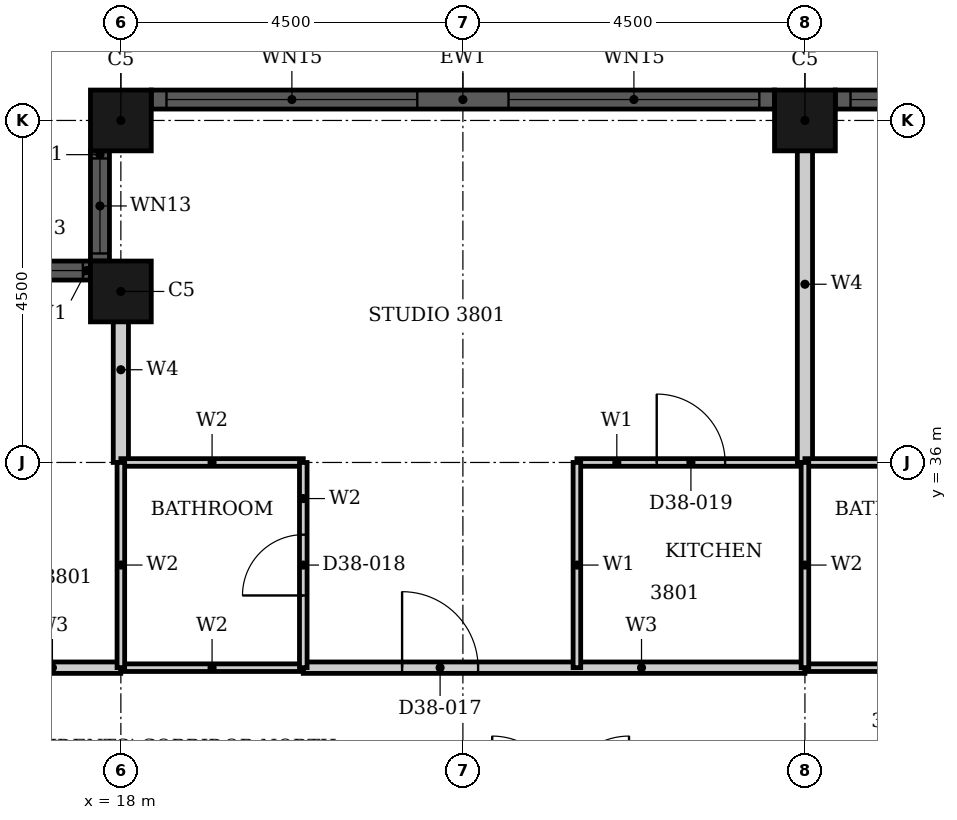
"""IFC4 building model, lengths in metres.
Left out: names, types, materials, properties, quantities, classifications, styles, units other than length and angle.
Written with IfcOpenShell. Run it as: python <this file> out.ifc"""

import sys

from ifc_helpers import new_model, si_unit, direction, frame, frame_2d, origin, origin_2d, place, context, subcontext, project, spatial, rectangle, hollow_rectangle, extrude, element, fill, save


model = new_model("IFC4")
c1 = context("Model", 3, precision=1e-05, world=origin(), true_north=direction((0.0, 1.0)))
c2 = subcontext(c1, "Body", "Model", "MODEL_VIEW")
j1 = project(units=[si_unit("LENGTHUNIT", "METRE"), si_unit("PLANEANGLEUNIT", "RADIAN")], contexts=[c1])
p1 = place(None, origin())
s1 = spatial("IfcSite", under=j1, at=p1, CompositionType="ELEMENT")
p2 = place(p1, origin())
s2 = spatial("IfcBuilding", under=s1, at=p2, CompositionType="ELEMENT")
p3 = place(p2, frame((0.0, 0.0, 154.3)))
s3 = spatial("IfcBuildingStorey", under=s2, at=p3, CompositionType="ELEMENT", Elevation=154.3)
for number, where, z_axis, x_axis in (
    (1, (27.0, 40.5, 0.0), (0.0, 0.0, 1.0), (1.0, 0.0, 0.0)),
    (2, (18.0, 40.5, 0.0), (0.0, 0.0, 1.0), (1.0, 0.0, 0.0)),
    (3, (18.0, 38.25, 0.0), (0.0, 0.0, 1.0), (1.0, 0.0, 0.0)),
):
    element("IfcColumn", number, at=place(p3, frame(where, z_axis=z_axis, x_axis=x_axis)), inside=s3, PredefinedType="COLUMN", context=c2, shape_type="SweptSolid", body=[
        extrude(hollow_rectangle(XDim=0.8, YDim=0.8, WallThickness=0.025, at=origin_2d()), origin(), (0.0, 0.0, 1.0), 3.7),
    ])
p4 = place(p3, frame((35.6, 40.775, 0.0), z_axis=(0.0, 0.0, 1.0), x_axis=(-1.0, 0.0, 0.0)))
e4 = element("IfcWall", 4, at=p4, inside=s3, PredefinedType="SOLIDWALL", context=c2, shape_type="SweptSolid", body=[
    extrude(rectangle(XDim=8.2, YDim=0.25, at=frame_2d((4.1, 0.0))), origin(), (0.0, 0.0, 1.0), 3.7),
])
p5 = place(p4, frame((0.2, 0.0, 0.45)))
e5 = element("IfcOpeningElement", 5, at=p5, cuts=e4, PredefinedType="OPENING", context=c2, shape_type="SweptSolid", body=[
    extrude(rectangle(XDim=3.3, YDim=2.3, at=frame_2d((1.65, 1.15))), frame((0.0, 0.135, 0.0), z_axis=(0.0, -1.0, 0.0), x_axis=(1.0, 0.0, 0.0)), (0.0, 0.0, 1.0), 0.27),
])
p6 = place(p4, frame((4.7, 0.0, 0.45)))
e6 = element("IfcOpeningElement", 6, at=p6, cuts=e4, PredefinedType="OPENING", context=c2, shape_type="SweptSolid", body=[
    extrude(rectangle(XDim=3.3, YDim=2.3, at=frame_2d((1.65, 1.15))), frame((0.0, 0.135, 0.0), z_axis=(0.0, -1.0, 0.0), x_axis=(1.0, 0.0, 0.0)), (0.0, 0.0, 1.0), 0.27),
])
p7 = place(p3, frame((26.6, 40.775, 0.0), z_axis=(0.0, 0.0, 1.0), x_axis=(-1.0, 0.0, 0.0)))
e7 = element("IfcWall", 7, at=p7, inside=s3, PredefinedType="SOLIDWALL", context=c2, shape_type="SweptSolid", body=[
    extrude(rectangle(XDim=8.2, YDim=0.25, at=frame_2d((4.1, 0.0))), origin(), (0.0, 0.0, 1.0), 3.7),
])
p8 = place(p7, frame((0.2, 0.0, 0.45)))
e8 = element("IfcOpeningElement", 8, at=p8, cuts=e7, PredefinedType="OPENING", context=c2, shape_type="SweptSolid", body=[
    extrude(rectangle(XDim=3.3, YDim=2.3, at=frame_2d((1.65, 1.15))), frame((0.0, 0.135, 0.0), z_axis=(0.0, -1.0, 0.0), x_axis=(1.0, 0.0, 0.0)), (0.0, 0.0, 1.0), 0.27),
])
p9 = place(p7, frame((4.7, 0.0, 0.45)))
e9 = element("IfcOpeningElement", 9, at=p9, cuts=e7, PredefinedType="OPENING", context=c2, shape_type="SweptSolid", body=[
    extrude(rectangle(XDim=3.3, YDim=2.3, at=frame_2d((1.65, 1.15))), frame((0.0, 0.135, 0.0), z_axis=(0.0, -1.0, 0.0), x_axis=(1.0, 0.0, 0.0)), (0.0, 0.0, 1.0), 0.27),
])
p10 = place(p3, frame((17.725, 40.1, 0.0), z_axis=(0.0, 0.0, 1.0), x_axis=(0.0, -1.0, 0.0)))
e10 = element("IfcWall", 10, at=p10, inside=s3, PredefinedType="SOLIDWALL", context=c2, shape_type="SweptSolid", body=[
    extrude(rectangle(XDim=1.45, YDim=0.25, at=frame_2d((0.725, 0.0))), origin(), (0.0, 0.0, 1.0), 3.7),
])
p11 = place(p10, frame((0.1, 0.0, 0.9)))
e11 = element("IfcOpeningElement", 11, at=p11, cuts=e10, PredefinedType="OPENING", context=c2, shape_type="SweptSolid", body=[
    extrude(rectangle(XDim=1.25, YDim=1.85, at=frame_2d((0.625, 0.925))), frame((0.0, 0.135, 0.0), z_axis=(0.0, -1.0, 0.0), x_axis=(1.0, 0.0, 0.0)), (0.0, 0.0, 1.0), 0.27),
])
p12 = place(p3, frame((17.6, 38.525, 0.0), z_axis=(0.0, 0.0, 1.0), x_axis=(-1.0, 0.0, 0.0)))
e12 = element("IfcWall", 12, at=p12, inside=s3, PredefinedType="SOLIDWALL", context=c2, shape_type="SweptSolid", body=[
    extrude(rectangle(XDim=1.45, YDim=0.25, at=frame_2d((0.725, 0.0))), origin(), (0.0, 0.0, 1.0), 3.7),
])
p13 = place(p12, frame((0.1, 0.0, 0.9)))
e13 = element("IfcOpeningElement", 13, at=p13, cuts=e12, PredefinedType="OPENING", context=c2, shape_type="SweptSolid", body=[
    extrude(rectangle(XDim=1.25, YDim=1.85, at=frame_2d((0.625, 0.925))), frame((0.0, 0.135, 0.0), z_axis=(0.0, -1.0, 0.0), x_axis=(1.0, 0.0, 0.0)), (0.0, 0.0, 1.0), 0.27),
])
p14 = place(p3, frame((20.4, 33.3, 0.0), z_axis=(0.0, 0.0, 1.0), x_axis=(1.0, 0.0, 0.0)))
e14 = element("IfcWall", 14, at=p14, inside=s3, PredefinedType="PARTITIONING", context=c2, shape_type="SweptSolid", body=[
    extrude(rectangle(XDim=6.6, YDim=0.15, at=frame_2d((3.3, 0.0))), origin(), (0.0, 0.0, 1.0), 3.4),
])
p15 = place(p14, frame((1.3, 0.0, 0.0)))
e15 = element("IfcOpeningElement", 15, at=p15, cuts=e14, PredefinedType="OPENING", context=c2, shape_type="SweptSolid", body=[
    extrude(rectangle(XDim=1.0, YDim=2.2, at=frame_2d((0.5, 1.1))), frame((0.0, 0.085, 0.0), z_axis=(0.0, -1.0, 0.0), x_axis=(1.0, 0.0, 0.0)), (0.0, 0.0, 1.0), 0.17),
])
p16 = place(p3, frame((16.2, 33.3, 0.0), z_axis=(0.0, 0.0, 1.0), x_axis=(1.0, 0.0, 0.0)))
e16 = element("IfcWall", 16, at=p16, inside=s3, PredefinedType="PARTITIONING", context=c2, shape_type="SweptSolid", body=[
    extrude(rectangle(XDim=1.799, YDim=0.15, at=frame_2d((0.899, 0.0))), origin(), (0.0, 0.0, 1.0), 3.4),
])
p17 = place(p3, frame((24.0, 36.0, 0.0), z_axis=(0.0, 0.0, 1.0), x_axis=(1.0, 0.0, 0.0)))
e17 = element("IfcWall", 17, at=p17, inside=s3, PredefinedType="PARTITIONING", context=c2, shape_type="SweptSolid", body=[
    extrude(rectangle(XDim=3.0, YDim=0.1, at=frame_2d((1.5, 0.0))), origin(), (0.0, 0.0, 1.0), 3.4),
])
p18 = place(p17, frame((1.05, 0.0, 0.0)))
e18 = element("IfcOpeningElement", 18, at=p18, cuts=e17, PredefinedType="OPENING", context=c2, shape_type="SweptSolid", body=[
    extrude(rectangle(XDim=0.9, YDim=2.1, at=frame_2d((0.45, 1.05))), frame((0.0, 0.06, 0.0), z_axis=(0.0, -1.0, 0.0), x_axis=(1.0, 0.0, 0.0)), (0.0, 0.0, 1.0), 0.12),
])
p19 = place(p3, frame((24.0, 33.3, 0.0), z_axis=(0.0, 0.0, 1.0), x_axis=(0.0, 1.0, 0.0)))
e19 = element("IfcWall", 19, at=p19, inside=s3, PredefinedType="PARTITIONING", context=c2, shape_type="SweptSolid", body=[
    extrude(rectangle(XDim=2.7, YDim=0.1, at=frame_2d((1.35, 0.0))), origin(), (0.0, 0.0, 1.0), 3.4),
])
p20 = place(p3, frame((18.0, 36.0, 0.0), z_axis=(0.0, 0.0, 1.0), x_axis=(0.0, 1.0, 0.0)))
e20 = element("IfcWall", 20, at=p20, inside=s3, PredefinedType="PARTITIONING", context=c2, shape_type="SweptSolid", body=[
    extrude(rectangle(XDim=2.44, YDim=0.2, at=frame_2d((1.22, 0.0))), origin(), (0.0, 0.0, 1.0), 3.4),
])
p21 = place(p3, frame((27.0, 36.0, 0.0), z_axis=(0.0, 0.0, 1.0), x_axis=(0.0, 1.0, 0.0)))
e21 = element("IfcWall", 21, at=p21, inside=s3, PredefinedType="PARTITIONING", context=c2, shape_type="SweptSolid", body=[
    extrude(rectangle(XDim=4.69, YDim=0.2, at=frame_2d((2.345, 0.0))), origin(), (0.0, 0.0, 1.0), 3.4),
])
for number, where, z_axis, x_axis in (
    (22, (18.0, 33.3, 0.0), (0.0, 0.0, 1.0), (1.0, 0.0, 0.0)),
    (23, (27.0, 33.3, 0.0), (0.0, 0.0, 1.0), (1.0, 0.0, 0.0)),
    (24, (18.0, 36.0, 0.0), (0.0, 0.0, 1.0), (1.0, 0.0, 0.0)),
    (25, (27.0, 36.0, 0.0), (0.0, 0.0, 1.0), (1.0, 0.0, 0.0)),
):
    element("IfcWall", number, at=place(p3, frame(where, z_axis=z_axis, x_axis=x_axis)), inside=s3, PredefinedType="PARTITIONING", context=c2, shape_type="SweptSolid", body=[
        extrude(rectangle(XDim=2.4, YDim=0.1, at=frame_2d((1.2, 0.0))), origin(), (0.0, 0.0, 1.0), 3.4),
    ])
p22 = place(p3, frame((18.0, 33.301, 0.0), z_axis=(0.0, 0.0, 1.0), x_axis=(0.0, 1.0, 0.0)))
e26 = element("IfcWall", 26, at=p22, inside=s3, PredefinedType="PARTITIONING", context=c2, shape_type="SweptSolid", body=[
    extrude(rectangle(XDim=2.699, YDim=0.1, at=frame_2d((1.35, 0.0))), origin(), (0.0, 0.0, 1.0), 3.4),
])
p23 = place(p3, frame((20.4, 33.3, 0.0), z_axis=(0.0, 0.0, 1.0), x_axis=(0.0, 1.0, 0.0)))
e27 = element("IfcWall", 27, at=p23, inside=s3, PredefinedType="PARTITIONING", context=c2, shape_type="SweptSolid", body=[
    extrude(rectangle(XDim=2.7, YDim=0.1, at=frame_2d((1.35, 0.0))), origin(), (0.0, 0.0, 1.0), 3.4),
])
p24 = place(p23, frame((0.95, 0.0, 0.0)))
e28 = element("IfcOpeningElement", 28, at=p24, cuts=e27, PredefinedType="OPENING", context=c2, shape_type="SweptSolid", body=[
    extrude(rectangle(XDim=0.8, YDim=2.1, at=frame_2d((0.4, 1.05))), frame((0.0, 0.06, 0.0), z_axis=(0.0, -1.0, 0.0), x_axis=(1.0, 0.0, 0.0)), (0.0, 0.0, 1.0), 0.12),
])
p25 = place(p3, frame((27.0, 33.3, 0.0), z_axis=(0.0, 0.0, 1.0), x_axis=(0.0, 1.0, 0.0)))
e29 = element("IfcWall", 29, at=p25, inside=s3, PredefinedType="PARTITIONING", context=c2, shape_type="SweptSolid", body=[
    extrude(rectangle(XDim=2.7, YDim=0.1, at=frame_2d((1.35, 0.0))), origin(), (0.0, 0.0, 1.0), 3.4),
])
p26 = place(p6, origin())
e30 = element("IfcWindow", 30, at=p26, inside=s3, PartitioningType="SINGLE_PANEL", PredefinedType="WINDOW", context=c2, shape_type="SweptSolid", body=[
    extrude(rectangle(XDim=3.3, YDim=2.3, at=frame_2d((1.65, 1.15))), frame((0.0, 0.03, 0.0), z_axis=(0.0, -1.0, 0.0), x_axis=(1.0, 0.0, 0.0)), (0.0, 0.0, 1.0), 0.06),
])
fill(e6, e30)
p27 = place(p8, origin())
e31 = element("IfcWindow", 31, at=p27, inside=s3, PartitioningType="SINGLE_PANEL", PredefinedType="WINDOW", context=c2, shape_type="SweptSolid", body=[
    extrude(rectangle(XDim=3.3, YDim=2.3, at=frame_2d((1.65, 1.15))), frame((0.0, 0.03, 0.0), z_axis=(0.0, -1.0, 0.0), x_axis=(1.0, 0.0, 0.0)), (0.0, 0.0, 1.0), 0.06),
])
fill(e8, e31)
p28 = place(p9, origin())
e32 = element("IfcWindow", 32, at=p28, inside=s3, PartitioningType="SINGLE_PANEL", PredefinedType="WINDOW", context=c2, shape_type="SweptSolid", body=[
    extrude(rectangle(XDim=3.3, YDim=2.3, at=frame_2d((1.65, 1.15))), frame((0.0, 0.03, 0.0), z_axis=(0.0, -1.0, 0.0), x_axis=(1.0, 0.0, 0.0)), (0.0, 0.0, 1.0), 0.06),
])
fill(e9, e32)
p29 = place(p11, origin())
e33 = element("IfcWindow", 33, at=p29, inside=s3, PartitioningType="SINGLE_PANEL", PredefinedType="WINDOW", context=c2, shape_type="SweptSolid", body=[
    extrude(rectangle(XDim=1.25, YDim=1.85, at=frame_2d((0.625, 0.925))), frame((0.0, 0.03, 0.0), z_axis=(0.0, -1.0, 0.0), x_axis=(1.0, 0.0, 0.0)), (0.0, 0.0, 1.0), 0.06),
])
fill(e11, e33)
p30 = place(p13, origin())
e34 = element("IfcWindow", 34, at=p30, inside=s3, PartitioningType="SINGLE_PANEL", PredefinedType="WINDOW", context=c2, shape_type="SweptSolid", body=[
    extrude(rectangle(XDim=1.25, YDim=1.85, at=frame_2d((0.625, 0.925))), frame((0.0, 0.03, 0.0), z_axis=(0.0, -1.0, 0.0), x_axis=(1.0, 0.0, 0.0)), (0.0, 0.0, 1.0), 0.06),
])
fill(e13, e34)
p31 = place(p15, origin())
e35 = element("IfcDoor", 35, at=p31, inside=s3, OperationType="SINGLE_SWING_LEFT", PredefinedType="DOOR", context=c2, shape_type="SweptSolid", body=[
    extrude(rectangle(XDim=1.0, YDim=2.2, at=frame_2d((0.5, 1.1))), frame((0.0, 0.025, 0.0), z_axis=(0.0, -1.0, 0.0), x_axis=(1.0, 0.0, 0.0)), (0.0, 0.0, 1.0), 0.05),
])
fill(e15, e35)
p32 = place(p24, origin())
e36 = element("IfcDoor", 36, at=p32, inside=s3, OperationType="SINGLE_SWING_LEFT", PredefinedType="DOOR", context=c2, shape_type="SweptSolid", body=[
    extrude(rectangle(XDim=0.8, YDim=2.1, at=frame_2d((0.4, 1.05))), frame((0.0, 0.025, 0.0), z_axis=(0.0, -1.0, 0.0), x_axis=(1.0, 0.0, 0.0)), (0.0, 0.0, 1.0), 0.05),
])
fill(e28, e36)
p33 = place(p18, origin())
e37 = element("IfcDoor", 37, at=p33, inside=s3, OperationType="SINGLE_SWING_LEFT", PredefinedType="DOOR", context=c2, shape_type="SweptSolid", body=[
    extrude(rectangle(XDim=0.9, YDim=2.1, at=frame_2d((0.45, 1.05))), frame((0.0, 0.025, 0.0), z_axis=(0.0, -1.0, 0.0), x_axis=(1.0, 0.0, 0.0)), (0.0, 0.0, 1.0), 0.05),
])
fill(e18, e37)
save(model, sys.argv[1])
